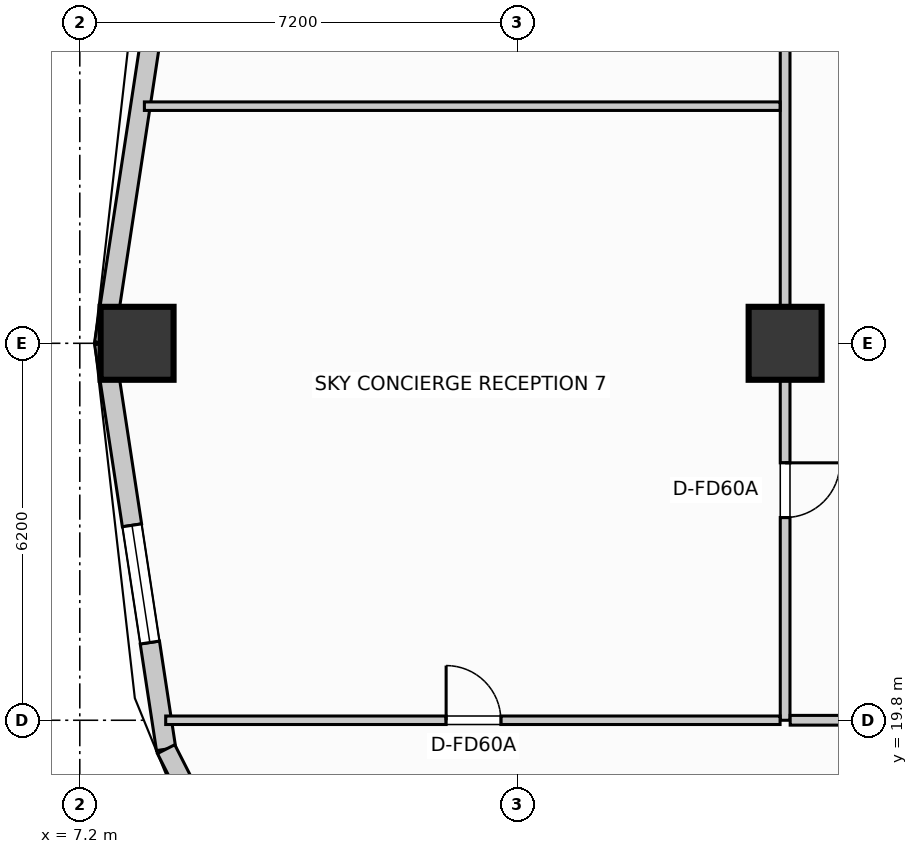
"""IFC4 building model, lengths in metres.
Left out: names, types, materials, properties, quantities, classifications, styles, units other than length and angle.
Written with IfcOpenShell. Run it as: python <this file> out.ifc"""

import sys

from ifc_helpers import new_model, si_unit, direction, frame, frame_2d, origin, origin_2d, place, context, subcontext, project, spatial, rectangle, extrude, element, fill, save


model = new_model("IFC4")
c1 = context("Model", 3, precision=1e-05, world=origin(), true_north=direction((0.0, 1.0)))
c2 = subcontext(c1, "Body", "Model", "MODEL_VIEW")
j1 = project(units=[si_unit("LENGTHUNIT", "METRE"), si_unit("PLANEANGLEUNIT", "RADIAN")], contexts=[c1])
p1 = place(None, origin())
s1 = spatial("IfcSite", under=j1, at=p1, CompositionType="ELEMENT")
p2 = place(p1, origin())
s2 = spatial("IfcBuilding", under=s1, at=p2, CompositionType="ELEMENT")
p3 = place(p2, frame((0.0, 0.0, 105.95)))
s3 = spatial("IfcBuildingStorey", under=s2, at=p3, CompositionType="ELEMENT", Elevation=105.95)
for number, where, z_axis, x_axis in (
    (1, (18.8, 26.0, 0.0), (0.0, 0.0, 1.0), (1.0, 0.0, 0.0)),
    (2, (8.142, 26.0, 0.0), (0.0, 0.0, 1.0), (-1.0, 0.0, 0.0)),
):
    element("IfcColumn", number, at=place(p3, frame(where, z_axis=z_axis, x_axis=x_axis)), inside=s3, PredefinedType="COLUMN", context=c2, shape_type="SweptSolid", body=[
        extrude(rectangle(XDim=1.2, YDim=1.2, at=origin_2d()), origin(), (0.0, 0.0, 1.0), 4.5),
    ])
p4 = place(p3, frame((8.619, 32.675, 0.0), z_axis=(0.0, 0.0, 1.0), x_axis=(-0.150633288003, -0.988589708901, 0.0)))
e3 = element("IfcWall", 3, at=p4, inside=s3, PredefinedType="STANDARD", context=c2, shape_type="SweptSolid", body=[
    extrude(rectangle(XDim=6.752, YDim=0.32, at=frame_2d((3.376, 0.0))), origin(), (0.0, 0.0, 1.0), 4.26),
])
p5 = place(p3, frame((7.602, 26.0, 0.0), z_axis=(0.0, 0.0, 1.0), x_axis=(0.150633288003, -0.988589708901, 0.0)))
e4 = element("IfcWall", 4, at=p5, inside=s3, PredefinedType="STANDARD", context=c2, shape_type="SweptSolid", body=[
    extrude(rectangle(XDim=6.752, YDim=0.32, at=frame_2d((3.376, 0.0))), origin(), (0.0, 0.0, 1.0), 4.26),
])
p6 = place(p5, frame((3.028, 0.0, 0.75)))
e5 = element("IfcOpeningElement", 5, at=p6, cuts=e4, PredefinedType="OPENING", context=c2, shape_type="SweptSolid", body=[
    extrude(rectangle(XDim=1.95, YDim=1.68, at=frame_2d((0.975, 0.84))), frame((0.0, 0.17, 0.0), z_axis=(0.0, -1.0, 0.0), x_axis=(1.0, 0.0, 0.0)), (0.0, 0.0, 1.0), 0.34),
])
p7 = place(p3, frame((8.619, 19.325, 0.0), z_axis=(0.0, 0.0, 1.0), x_axis=(0.453374078001, -0.89132033826, 0.0)))
e6 = element("IfcWall", 6, at=p7, inside=s3, PredefinedType="STANDARD", context=c2, shape_type="SweptSolid", body=[
    extrude(rectangle(XDim=6.71, YDim=0.32, at=frame_2d((3.355, 0.0))), origin(), (0.0, 0.0, 1.0), 3.619),
])
p8 = place(p3, frame((18.8, 19.8, 0.0), z_axis=(0.0, 0.0, 1.0), x_axis=(0.0, 1.0, 0.0)))
e7 = element("IfcWall", 7, at=p8, inside=s3, PredefinedType="PARTITIONING", context=c2, shape_type="SweptSolid", body=[
    extrude(rectangle(XDim=15.75, YDim=0.16, at=frame_2d((7.875, 0.0))), origin(), (0.0, 0.0, 1.0), 4.245),
])
p9 = place(p8, frame((3.334, 0.0, 0.0)))
e8 = element("IfcOpeningElement", 8, at=p9, cuts=e7, PredefinedType="OPENING", context=c2, shape_type="SweptSolid", body=[
    extrude(rectangle(XDim=0.9, YDim=2.0, at=frame_2d((0.45, 1.0))), frame((0.0, 0.09, 0.0), z_axis=(0.0, -1.0, 0.0), x_axis=(1.0, 0.0, 0.0)), (0.0, 0.0, 1.0), 0.18),
])
p10 = place(p8, frame((12.527, 0.0, 0.0)))
e9 = element("IfcOpeningElement", 9, at=p10, cuts=e7, PredefinedType="OPENING", context=c2, shape_type="SweptSolid", body=[
    extrude(rectangle(XDim=0.9, YDim=2.0, at=frame_2d((0.45, 1.0))), frame((0.0, 0.09, 0.0), z_axis=(0.0, -1.0, 0.0), x_axis=(1.0, 0.0, 0.0)), (0.0, 0.0, 1.0), 0.18),
])
p11 = place(p3, frame((18.883, 19.8, 0.0), z_axis=(0.0, 0.0, 1.0), x_axis=(1.0, 0.0, 0.0)))
e10 = element("IfcWall", 10, at=p11, inside=s3, PredefinedType="PARTITIONING", context=c2, shape_type="SweptSolid", body=[
    extrude(rectangle(XDim=2.437, YDim=0.16, at=frame_2d((1.219, 0.0))), origin(), (0.0, 0.0, 1.0), 3.618),
])
p12 = place(p3, frame((8.613, 19.8, 0.0), z_axis=(0.0, 0.0, 1.0), x_axis=(1.0, 0.0, 0.0)))
e11 = element("IfcWall", 11, at=p12, inside=s3, PredefinedType="PARTITIONING", context=c2, shape_type="SweptSolid", body=[
    extrude(rectangle(XDim=10.104, YDim=0.14, at=frame_2d((5.052, 0.0))), origin(), (0.0, 0.0, 1.0), 3.618),
])
p13 = place(p12, frame((4.612, 0.0, 0.0)))
e12 = element("IfcOpeningElement", 12, at=p13, cuts=e11, PredefinedType="OPENING", context=c2, shape_type="SweptSolid", body=[
    extrude(rectangle(XDim=0.9, YDim=2.0, at=frame_2d((0.45, 1.0))), frame((0.0, 0.08, 0.0), z_axis=(0.0, -1.0, 0.0), x_axis=(1.0, 0.0, 0.0)), (0.0, 0.0, 1.0), 0.16),
])
p14 = place(p3, frame((8.262, 29.9, 0.0), z_axis=(0.0, 0.0, 1.0), x_axis=(1.0, 0.0, 0.0)))
e13 = element("IfcWall", 13, at=p14, inside=s3, PredefinedType="PARTITIONING", context=c2, shape_type="SweptSolid", body=[
    extrude(rectangle(XDim=10.455, YDim=0.14, at=frame_2d((5.227, 0.0))), origin(), (0.0, 0.0, 1.0), 4.245),
])
p15 = place(p6, origin())
e14 = element("IfcWindow", 14, at=p15, inside=s3, PartitioningType="SINGLE_PANEL", PredefinedType="WINDOW", context=c2, shape_type="SweptSolid", body=[
    extrude(rectangle(XDim=1.95, YDim=1.68, at=frame_2d((0.975, 0.84))), frame((0.0, 0.03, 0.0), z_axis=(0.0, -1.0, 0.0), x_axis=(1.0, 0.0, 0.0)), (0.0, 0.0, 1.0), 0.06),
])
fill(e5, e14)
p16 = place(p9, frame((0.9, 0.0, 0.0), z_axis=(0.0, 0.0, 1.0), x_axis=(-1.0, 0.0, 0.0)))
e15 = element("IfcDoor", 15, at=p16, inside=s3, OperationType="SINGLE_SWING_LEFT", PredefinedType="DOOR", context=c2, shape_type="SweptSolid", body=[
    extrude(rectangle(XDim=0.9, YDim=2.0, at=frame_2d((0.45, 1.0))), frame((0.0, 0.025, 0.0), z_axis=(0.0, -1.0, 0.0), x_axis=(1.0, 0.0, 0.0)), (0.0, 0.0, 1.0), 0.05),
])
fill(e8, e15)
p17 = place(p13, origin())
e16 = element("IfcDoor", 16, at=p17, inside=s3, OperationType="SINGLE_SWING_LEFT", PredefinedType="DOOR", context=c2, shape_type="SweptSolid", body=[
    extrude(rectangle(XDim=0.9, YDim=2.0, at=frame_2d((0.45, 1.0))), frame((0.0, 0.025, 0.0), z_axis=(0.0, -1.0, 0.0), x_axis=(1.0, 0.0, 0.0)), (0.0, 0.0, 1.0), 0.05),
])
fill(e12, e16)
save(model, sys.argv[1])
